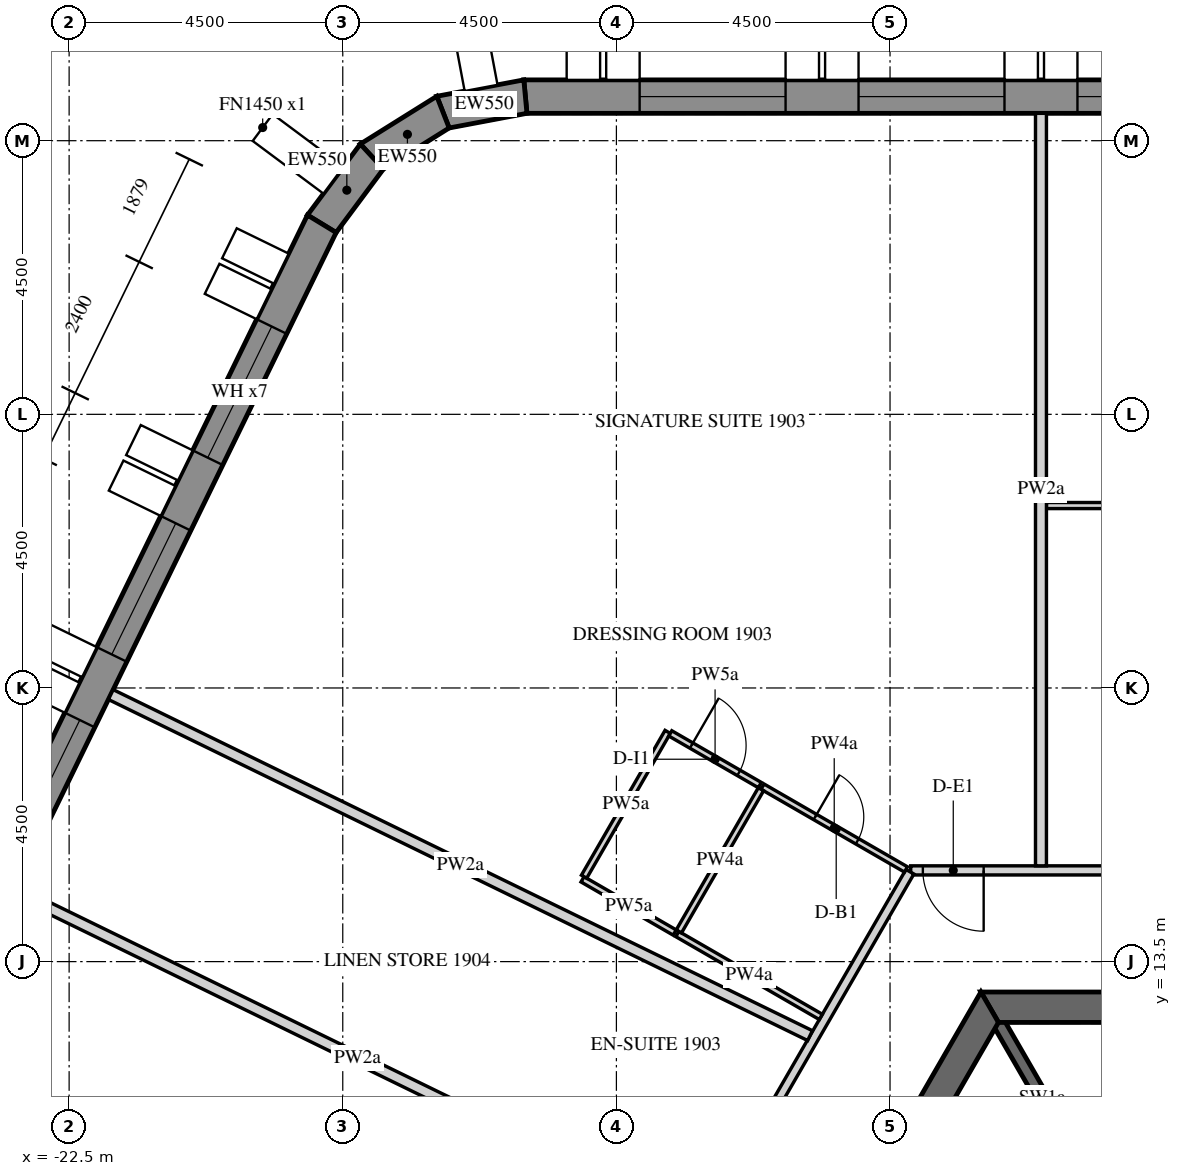
"""IFC4 building model, lengths in metres.
Left out: names, types, materials, properties, quantities, classifications, styles, units other than length and angle.
Written with IfcOpenShell. Run it as: python <this file> out.ifc"""

import sys

from ifc_helpers import new_model, si_unit, direction, frame, frame_2d, origin, place, context, subcontext, project, spatial, polyline, rectangle, outline, extrude, element, fill, save


model = new_model("IFC4")
c1 = context("Model", 3, precision=1e-05, world=origin(), true_north=direction((0.0, 1.0)))
c2 = subcontext(c1, "Body", "Model", "MODEL_VIEW")
j1 = project(units=[si_unit("LENGTHUNIT", "METRE"), si_unit("PLANEANGLEUNIT", "RADIAN")], contexts=[c1])
p1 = place(None, origin())
s1 = spatial("IfcSite", under=j1, at=p1, CompositionType="ELEMENT")
p2 = place(p1, origin())
s2 = spatial("IfcBuilding", under=s1, at=p2, CompositionType="ELEMENT")
p3 = place(p2, frame((0.0, 0.0, 238.5)))
s3 = spatial("IfcBuildingStorey", under=s2, at=p3, CompositionType="ELEMENT", Elevation=238.5)
p4 = place(p3, frame((12.761, 27.725, -0.15), z_axis=(0.0, 0.0, 1.0), x_axis=(-1.0, 0.0, 0.0)))
e1 = element("IfcWall", 1, at=p4, inside=s3, PredefinedType="SOLIDWALL", context=c2, shape_type="SweptSolid", body=[
    extrude(outline(polyline([(-0.022, -0.275), (27.783, -0.275), (27.732, 0.275), (0.022, 0.275), (-0.022, -0.275)])), origin(), (0.0, 0.0, 1.0), 3.9),
])
p5 = place(p4, frame((1.879, 0.0, 1.05)))
e2 = element("IfcOpeningElement", 2, at=p5, cuts=e1, PredefinedType="OPENING", context=c2, shape_type="SweptSolid", body=[
    extrude(rectangle(XDim=2.4, YDim=2.4, at=frame_2d((1.2, 1.2))), frame((0.0, 0.285, 0.0), z_axis=(0.0, -1.0, 0.0), x_axis=(1.0, 0.0, 0.0)), (0.0, 0.0, 1.0), 0.57),
])
p6 = place(p4, frame((5.479, 0.0, 1.05)))
e3 = element("IfcOpeningElement", 3, at=p6, cuts=e1, PredefinedType="OPENING", context=c2, shape_type="SweptSolid", body=[
    extrude(rectangle(XDim=2.4, YDim=2.4, at=frame_2d((1.2, 1.2))), frame((0.0, 0.285, 0.0), z_axis=(0.0, -1.0, 0.0), x_axis=(1.0, 0.0, 0.0)), (0.0, 0.0, 1.0), 0.57),
])
p7 = place(p4, frame((9.079, 0.0, 1.05)))
e4 = element("IfcOpeningElement", 4, at=p7, cuts=e1, PredefinedType="OPENING", context=c2, shape_type="SweptSolid", body=[
    extrude(rectangle(XDim=2.4, YDim=2.4, at=frame_2d((1.2, 1.2))), frame((0.0, 0.285, 0.0), z_axis=(0.0, -1.0, 0.0), x_axis=(1.0, 0.0, 0.0)), (0.0, 0.0, 1.0), 0.57),
])
p8 = place(p4, frame((12.679, 0.0, 1.05)))
e5 = element("IfcOpeningElement", 5, at=p8, cuts=e1, PredefinedType="OPENING", context=c2, shape_type="SweptSolid", body=[
    extrude(rectangle(XDim=2.4, YDim=2.4, at=frame_2d((1.2, 1.2))), frame((0.0, 0.285, 0.0), z_axis=(0.0, -1.0, 0.0), x_axis=(1.0, 0.0, 0.0)), (0.0, 0.0, 1.0), 0.57),
])
p9 = place(p4, frame((16.279, 0.0, 1.05)))
e6 = element("IfcOpeningElement", 6, at=p9, cuts=e1, PredefinedType="OPENING", context=c2, shape_type="SweptSolid", body=[
    extrude(rectangle(XDim=2.4, YDim=2.4, at=frame_2d((1.2, 1.2))), frame((0.0, 0.285, 0.0), z_axis=(0.0, -1.0, 0.0), x_axis=(1.0, 0.0, 0.0)), (0.0, 0.0, 1.0), 0.57),
])
p10 = place(p4, frame((19.879, 0.0, 1.05)))
e7 = element("IfcOpeningElement", 7, at=p10, cuts=e1, PredefinedType="OPENING", context=c2, shape_type="SweptSolid", body=[
    extrude(rectangle(XDim=2.4, YDim=2.4, at=frame_2d((1.2, 1.2))), frame((0.0, 0.285, 0.0), z_axis=(0.0, -1.0, 0.0), x_axis=(1.0, 0.0, 0.0)), (0.0, 0.0, 1.0), 0.57),
])
p11 = place(p4, frame((23.479, 0.0, 1.05)))
e8 = element("IfcOpeningElement", 8, at=p11, cuts=e1, PredefinedType="OPENING", context=c2, shape_type="SweptSolid", body=[
    extrude(rectangle(XDim=2.4, YDim=2.4, at=frame_2d((1.2, 1.2))), frame((0.0, 0.285, 0.0), z_axis=(0.0, -1.0, 0.0), x_axis=(1.0, 0.0, 0.0)), (0.0, 0.0, 1.0), 0.57),
])
p12 = place(p3, frame((-14.997, 27.725, -0.15), z_axis=(0.0, 0.0, 1.0), x_axis=(-0.982705443133, -0.185175624845, 0.0)))
e9 = element("IfcWall", 9, at=p12, inside=s3, PredefinedType="SOLIDWALL", context=c2, shape_type="SweptSolid", body=[
    extrude(outline(polyline([(-0.026, -0.275), (1.431, -0.275), (1.327, 0.275), (0.026, 0.275), (-0.026, -0.275)])), origin(), (0.0, 0.0, 1.0), 3.9),
])
p13 = place(p3, frame((-16.352, 27.47, -0.15), z_axis=(0.0, 0.0, 1.0), x_axis=(-0.848057977594, -0.5299034503, 0.0)))
e10 = element("IfcWall", 10, at=p13, inside=s3, PredefinedType="SOLIDWALL", context=c2, shape_type="SweptSolid", body=[
    extrude(outline(polyline([(-0.052, -0.275), (1.431, -0.275), (1.327, 0.275), (0.052, 0.275), (-0.052, -0.275)])), origin(), (0.0, 0.0, 1.0), 3.9),
])
p14 = place(p3, frame((-17.521, 26.739, -0.15), z_axis=(0.0, 0.0, 1.0), x_axis=(-0.597135295884, -0.802140535324, 0.0)))
e11 = element("IfcWall", 11, at=p14, inside=s3, PredefinedType="SOLIDWALL", context=c2, shape_type="SweptSolid", body=[
    extrude(outline(polyline([(-0.052, -0.275), (1.405, -0.275), (1.354, 0.275), (0.052, 0.275), (-0.052, -0.275)])), origin(), (0.0, 0.0, 1.0), 3.9),
])
p15 = place(p3, frame((-18.345, 25.633, -0.15), z_axis=(0.0, 0.0, 1.0), x_axis=(-0.43837181828, -0.898793718791, 0.0)))
e12 = element("IfcWall", 12, at=p15, inside=s3, PredefinedType="SOLIDWALL", context=c2, shape_type="SweptSolid", body=[
    extrude(outline(polyline([(-0.026, -0.275), (27.78, -0.275), (27.735, 0.275), (0.026, 0.275), (-0.026, -0.275)])), origin(), (0.0, 0.0, 1.0), 3.9),
])
p16 = place(p15, frame((1.879, 0.0, 1.05)))
e13 = element("IfcOpeningElement", 13, at=p16, cuts=e12, PredefinedType="OPENING", context=c2, shape_type="SweptSolid", body=[
    extrude(rectangle(XDim=2.4, YDim=2.4, at=frame_2d((1.2, 1.2))), frame((0.0, 0.285, 0.0), z_axis=(0.0, -1.0, 0.0), x_axis=(1.0, 0.0, 0.0)), (0.0, 0.0, 1.0), 0.57),
])
p17 = place(p15, frame((5.479, 0.0, 1.05)))
e14 = element("IfcOpeningElement", 14, at=p17, cuts=e12, PredefinedType="OPENING", context=c2, shape_type="SweptSolid", body=[
    extrude(rectangle(XDim=2.4, YDim=2.4, at=frame_2d((1.2, 1.2))), frame((0.0, 0.285, 0.0), z_axis=(0.0, -1.0, 0.0), x_axis=(1.0, 0.0, 0.0)), (0.0, 0.0, 1.0), 0.57),
])
p18 = place(p15, frame((9.079, 0.0, 1.05)))
e15 = element("IfcOpeningElement", 15, at=p18, cuts=e12, PredefinedType="OPENING", context=c2, shape_type="SweptSolid", body=[
    extrude(rectangle(XDim=2.4, YDim=2.4, at=frame_2d((1.2, 1.2))), frame((0.0, 0.285, 0.0), z_axis=(0.0, -1.0, 0.0), x_axis=(1.0, 0.0, 0.0)), (0.0, 0.0, 1.0), 0.57),
])
p19 = place(p15, frame((12.679, 0.0, 1.05)))
e16 = element("IfcOpeningElement", 16, at=p19, cuts=e12, PredefinedType="OPENING", context=c2, shape_type="SweptSolid", body=[
    extrude(rectangle(XDim=2.4, YDim=2.4, at=frame_2d((1.2, 1.2))), frame((0.0, 0.285, 0.0), z_axis=(0.0, -1.0, 0.0), x_axis=(1.0, 0.0, 0.0)), (0.0, 0.0, 1.0), 0.57),
])
p20 = place(p15, frame((16.279, 0.0, 1.05)))
e17 = element("IfcOpeningElement", 17, at=p20, cuts=e12, PredefinedType="OPENING", context=c2, shape_type="SweptSolid", body=[
    extrude(rectangle(XDim=2.4, YDim=2.4, at=frame_2d((1.2, 1.2))), frame((0.0, 0.285, 0.0), z_axis=(0.0, -1.0, 0.0), x_axis=(1.0, 0.0, 0.0)), (0.0, 0.0, 1.0), 0.57),
])
p21 = place(p15, frame((19.879, 0.0, 1.05)))
e18 = element("IfcOpeningElement", 18, at=p21, cuts=e12, PredefinedType="OPENING", context=c2, shape_type="SweptSolid", body=[
    extrude(rectangle(XDim=2.4, YDim=2.4, at=frame_2d((1.2, 1.2))), frame((0.0, 0.285, 0.0), z_axis=(0.0, -1.0, 0.0), x_axis=(1.0, 0.0, 0.0)), (0.0, 0.0, 1.0), 0.57),
])
p22 = place(p15, frame((23.479, 0.0, 1.05)))
e19 = element("IfcOpeningElement", 19, at=p22, cuts=e12, PredefinedType="OPENING", context=c2, shape_type="SweptSolid", body=[
    extrude(rectangle(XDim=2.4, YDim=2.4, at=frame_2d((1.2, 1.2))), frame((0.0, 0.285, 0.0), z_axis=(0.0, -1.0, 0.0), x_axis=(1.0, 0.0, 0.0)), (0.0, 0.0, 1.0), 0.57),
])
p23 = place(p3, frame((-7.361, 12.75, -0.15), z_axis=(0.0, 0.0, 1.0), x_axis=(-0.50000571537, -0.866022103989, 0.0)))
e20 = element("IfcWall", 20, at=p23, inside=s3, PredefinedType="SHEAR", context=c2, shape_type="SweptSolid", body=[
    extrude(outline(polyline([(-0.144, -0.25), (14.867, -0.25), (14.578, 0.25), (0.144, 0.25), (-0.144, -0.25)])), origin(), (0.0, 0.0, 1.0), 3.9),
])
p24 = place(p23, frame((6.49, 0.0, 0.15)))
e21 = element("IfcOpeningElement", 21, at=p24, cuts=e20, PredefinedType="OPENING", context=c2, shape_type="SweptSolid", body=[
    extrude(rectangle(XDim=1.8, YDim=2.4, at=frame_2d((0.9, 1.2))), frame((0.0, 0.26, 0.0), z_axis=(0.0, -1.0, 0.0), x_axis=(1.0, 0.0, 0.0)), (0.0, 0.0, 1.0), 0.52),
])
p25 = place(p3, frame((7.361, 12.75, -0.15), z_axis=(0.0, 0.0, 1.0), x_axis=(-1.0, 0.0, 0.0)))
e22 = element("IfcWall", 22, at=p25, inside=s3, PredefinedType="SHEAR", context=c2, shape_type="SweptSolid", body=[
    extrude(outline(polyline([(-0.144, -0.25), (14.866, -0.25), (14.578, 0.25), (0.144, 0.25), (-0.144, -0.25)])), origin(), (0.0, 0.0, 1.0), 3.9),
])
p26 = place(p25, frame((6.761, 0.0, 0.15)))
e23 = element("IfcOpeningElement", 23, at=p26, cuts=e22, PredefinedType="OPENING", context=c2, shape_type="SweptSolid", body=[
    extrude(rectangle(XDim=1.2, YDim=2.4, at=frame_2d((0.6, 1.2))), frame((0.0, 0.26, 0.0), z_axis=(0.0, -1.0, 0.0), x_axis=(1.0, 0.0, 0.0)), (0.0, 0.0, 1.0), 0.52),
])
p27 = place(p3, frame((-5.773, 10.0, -0.15), z_axis=(0.0, 0.0, 1.0), x_axis=(-0.499995765644, 0.866027848477, 0.0)))
e24 = element("IfcWall", 24, at=p27, inside=s3, PredefinedType="SHEAR", context=c2, shape_type="SweptSolid", body=[
    extrude(rectangle(XDim=2.887, YDim=0.2, at=frame_2d((1.443, 0.0))), origin(), (0.0, 0.0, 1.0), 3.9),
])
p28 = place(p3, frame((4.207, 15.0, 0.0), z_axis=(0.0, 0.0, 1.0), x_axis=(-1.0, 0.0, 0.0)))
e25 = element("IfcWall", 25, at=p28, inside=s3, PredefinedType="PARTITIONING", context=c2, shape_type="SweptSolid", body=[
    extrude(rectangle(XDim=12.867, YDim=0.15, at=frame_2d((6.434, 0.0))), origin(), (0.0, 0.0, 1.0), 2.838),
])
p29 = place(p28, frame((6.025, 0.0, 0.0)))
e26 = element("IfcOpeningElement", 26, at=p29, cuts=e25, PredefinedType="OPENING", context=c2, shape_type="SweptSolid", body=[
    extrude(rectangle(XDim=1.0, YDim=2.1, at=frame_2d((0.5, 1.05))), frame((0.0, 0.085, 0.0), z_axis=(0.0, -1.0, 0.0), x_axis=(1.0, 0.0, 0.0)), (0.0, 0.0, 1.0), 0.17),
])
p30 = place(p28, frame((11.667, 0.0, 0.0)))
e27 = element("IfcOpeningElement", 27, at=p30, cuts=e25, PredefinedType="OPENING", context=c2, shape_type="SweptSolid", body=[
    extrude(rectangle(XDim=1.0, YDim=2.1, at=frame_2d((0.5, 1.05))), frame((0.0, 0.085, 0.0), z_axis=(0.0, -1.0, 0.0), x_axis=(1.0, 0.0, 0.0)), (0.0, 0.0, 1.0), 0.17),
])
p31 = place(p3, frame((-8.673, 14.978, 0.0), z_axis=(0.0, 0.0, 1.0), x_axis=(-0.50000700621, -0.86602135871, 0.0)))
e28 = element("IfcWall", 28, at=p31, inside=s3, PredefinedType="PARTITIONING", context=c2, shape_type="SweptSolid", body=[
    extrude(rectangle(XDim=14.928, YDim=0.15, at=frame_2d((7.464, 0.0))), origin(), (0.0, 0.0, 1.0), 2.838),
])
p32 = place(p31, frame((4.454, 0.0, 0.0)))
e29 = element("IfcOpeningElement", 29, at=p32, cuts=e28, PredefinedType="OPENING", context=c2, shape_type="SweptSolid", body=[
    extrude(rectangle(XDim=1.0, YDim=2.1, at=frame_2d((0.5, 1.05))), frame((0.0, 0.085, 0.0), z_axis=(0.0, -1.0, 0.0), x_axis=(1.0, 0.0, 0.0)), (0.0, 0.0, 1.0), 0.17),
])
p33 = place(p31, frame((11.264, 0.0, 0.0)))
e30 = element("IfcOpeningElement", 30, at=p33, cuts=e28, PredefinedType="OPENING", context=c2, shape_type="SweptSolid", body=[
    extrude(rectangle(XDim=1.0, YDim=2.1, at=frame_2d((0.5, 1.05))), frame((0.0, 0.085, 0.0), z_axis=(0.0, -1.0, 0.0), x_axis=(1.0, 0.0, 0.0)), (0.0, 0.0, 1.0), 0.17),
])
p34 = place(p3, frame((0.632, 21.0, 0.0), z_axis=(0.0, 0.0, 1.0), x_axis=(-1.0, 0.0, 0.0)))
e31 = element("IfcWall", 31, at=p34, inside=s3, PredefinedType="PARTITIONING", context=c2, shape_type="SweptSolid", body=[
    extrude(rectangle(XDim=7.06, YDim=0.1, at=frame_2d((3.53, 0.0))), origin(), (0.0, 0.0, 1.0), 2.838),
])
p35 = place(p34, frame((3.1, 0.0, 0.0)))
e32 = element("IfcOpeningElement", 32, at=p35, cuts=e31, PredefinedType="OPENING", context=c2, shape_type="SweptSolid", body=[
    extrude(rectangle(XDim=0.9, YDim=2.1, at=frame_2d((0.45, 1.05))), frame((0.0, 0.06, 0.0), z_axis=(0.0, -1.0, 0.0), x_axis=(1.0, 0.0, 0.0)), (0.0, 0.0, 1.0), 0.12),
])
p36 = place(p3, frame((-6.518, 27.45, 0.0), z_axis=(0.0, 0.0, 1.0), x_axis=(0.0, -1.0, 0.0)))
e33 = element("IfcWall", 33, at=p36, inside=s3, PredefinedType="PARTITIONING", context=c2, shape_type="SweptSolid", body=[
    extrude(rectangle(XDim=12.375, YDim=0.18, at=frame_2d((6.188, 0.0))), origin(), (0.0, 0.0, 1.0), 2.838),
])
p37 = place(p3, frame((-10.138, 12.591, 0.0), z_axis=(0.0, 0.0, 1.0), x_axis=(-0.866051307416, 0.49995513091, 0.0)))
e34 = element("IfcWall", 34, at=p37, inside=s3, PredefinedType="PARTITIONING", context=c2, shape_type="SweptSolid", body=[
    extrude(rectangle(XDim=2.725, YDim=0.1, at=frame_2d((1.362, 0.0))), origin(), (0.0, 0.0, 1.0), 2.838),
])
p38 = place(p3, frame((-11.098, 16.378, 0.0), z_axis=(0.0, 0.0, 1.0), x_axis=(0.866012511928, -0.500022328685, 0.0)))
e35 = element("IfcWall", 35, at=p38, inside=s3, PredefinedType="PARTITIONING", context=c2, shape_type="SweptSolid", body=[
    extrude(rectangle(XDim=2.725, YDim=0.1, at=frame_2d((1.363, 0.0))), origin(), (0.0, 0.0, 1.0), 2.838),
])
p39 = place(p38, frame((1.0, 0.0, 0.0)))
e36 = element("IfcOpeningElement", 36, at=p39, cuts=e35, PredefinedType="OPENING", context=c2, shape_type="SweptSolid", body=[
    extrude(rectangle(XDim=0.8, YDim=2.1, at=frame_2d((0.4, 1.05))), frame((0.0, 0.06, 0.0), z_axis=(0.0, -1.0, 0.0), x_axis=(1.0, 0.0, 0.0)), (0.0, 0.0, 1.0), 0.12),
])
p40 = place(p3, frame((-12.541, 13.978, 0.0), z_axis=(0.0, 0.0, 1.0), x_axis=(-0.866036909293, 0.499980071345, 0.0)))
e37 = element("IfcWall", 37, at=p40, inside=s3, PredefinedType="PARTITIONING", context=c2, shape_type="SweptSolid", body=[
    extrude(rectangle(XDim=1.75, YDim=0.1, at=frame_2d((0.875, 0.0))), origin(), (0.0, 0.0, 1.0), 2.838),
])
p41 = place(p3, frame((-14.031, 14.896, 0.0), z_axis=(0.0, 0.0, 1.0), x_axis=(0.499996545922, 0.866027397988, 0.0)))
e38 = element("IfcWall", 38, at=p41, inside=s3, PredefinedType="PARTITIONING", context=c2, shape_type="SweptSolid", body=[
    extrude(rectangle(XDim=2.75, YDim=0.1, at=frame_2d((1.375, 0.0))), origin(), (0.0, 0.0, 1.0), 2.838),
])
p42 = place(p3, frame((-12.613, 17.253, 0.0), z_axis=(0.0, 0.0, 1.0), x_axis=(0.865989465428, -0.500062241894, 0.0)))
e39 = element("IfcWall", 39, at=p42, inside=s3, PredefinedType="PARTITIONING", context=c2, shape_type="SweptSolid", body=[
    extrude(rectangle(XDim=1.7, YDim=0.1, at=frame_2d((0.85, 0.0))), origin(), (0.0, 0.0, 1.0), 2.838),
])
p43 = place(p42, frame((0.4, 0.0, 0.0)))
e40 = element("IfcOpeningElement", 40, at=p43, cuts=e39, PredefinedType="OPENING", context=c2, shape_type="SweptSolid", body=[
    extrude(rectangle(XDim=0.9, YDim=2.1, at=frame_2d((0.45, 1.05))), frame((0.0, 0.06, 0.0), z_axis=(0.0, -1.0, 0.0), x_axis=(1.0, 0.0, 0.0)), (0.0, 0.0, 1.0), 0.12),
])
p44 = place(p3, frame((-21.815, 17.892, 0.0), z_axis=(0.0, 0.0, 1.0), x_axis=(0.898799253997, -0.438360469265, 0.0)))
e41 = element("IfcWall", 41, at=p44, inside=s3, PredefinedType="PARTITIONING", context=c2, shape_type="SweptSolid", body=[
    extrude(rectangle(XDim=12.794, YDim=0.18, at=frame_2d((6.397, 0.0))), origin(), (0.0, 0.0, 1.0), 2.838),
])
p45 = place(p3, frame((-11.123, 16.335, 0.0), z_axis=(0.0, 0.0, 1.0), x_axis=(-0.499980770555, -0.866036505625, 0.0)))
e42 = element("IfcWall", 42, at=p45, inside=s3, PredefinedType="PARTITIONING", context=c2, shape_type="SweptSolid", body=[
    extrude(rectangle(XDim=2.7, YDim=0.1, at=frame_2d((1.35, 0.0))), origin(), (0.0, 0.0, 1.0), 2.838),
])
p46 = place(p3, frame((-23.393, 14.656, 0.0), z_axis=(0.0, 0.0, 1.0), x_axis=(0.898790706576, -0.43837799417, 0.0)))
e43 = element("IfcWall", 43, at=p46, inside=s3, PredefinedType="PARTITIONING", context=c2, shape_type="SweptSolid", body=[
    extrude(rectangle(XDim=12.542, YDim=0.18, at=frame_2d((6.271, 0.0))), origin(), (0.0, 0.0, 1.0), 2.838),
])
p47 = place(p9, frame((0.0, 0.205, 0.0)))
e44 = element("IfcWindow", 44, at=p47, inside=s3, PartitioningType="DOUBLE_PANEL_VERTICAL", PredefinedType="WINDOW", context=c2, shape_type="SweptSolid", body=[
    extrude(rectangle(XDim=2.4, YDim=2.4, at=frame_2d((1.2, 1.2))), frame((0.0, 0.03, 0.0), z_axis=(0.0, -1.0, 0.0), x_axis=(1.0, 0.0, 0.0)), (0.0, 0.0, 1.0), 0.06),
])
fill(e6, e44)
p48 = place(p10, frame((0.0, 0.205, 0.0)))
e45 = element("IfcWindow", 45, at=p48, inside=s3, PartitioningType="DOUBLE_PANEL_VERTICAL", PredefinedType="WINDOW", context=c2, shape_type="SweptSolid", body=[
    extrude(rectangle(XDim=2.4, YDim=2.4, at=frame_2d((1.2, 1.2))), frame((0.0, 0.03, 0.0), z_axis=(0.0, -1.0, 0.0), x_axis=(1.0, 0.0, 0.0)), (0.0, 0.0, 1.0), 0.06),
])
fill(e7, e45)
p49 = place(p11, frame((0.0, 0.205, 0.0)))
e46 = element("IfcWindow", 46, at=p49, inside=s3, PartitioningType="DOUBLE_PANEL_VERTICAL", PredefinedType="WINDOW", context=c2, shape_type="SweptSolid", body=[
    extrude(rectangle(XDim=2.4, YDim=2.4, at=frame_2d((1.2, 1.2))), frame((0.0, 0.03, 0.0), z_axis=(0.0, -1.0, 0.0), x_axis=(1.0, 0.0, 0.0)), (0.0, 0.0, 1.0), 0.06),
])
fill(e8, e46)
p50 = place(p16, frame((0.0, 0.205, 0.0)))
e47 = element("IfcWindow", 47, at=p50, inside=s3, PartitioningType="DOUBLE_PANEL_VERTICAL", PredefinedType="WINDOW", context=c2, shape_type="SweptSolid", body=[
    extrude(rectangle(XDim=2.4, YDim=2.4, at=frame_2d((1.2, 1.2))), frame((0.0, 0.03, 0.0), z_axis=(0.0, -1.0, 0.0), x_axis=(1.0, 0.0, 0.0)), (0.0, 0.0, 1.0), 0.06),
])
fill(e13, e47)
p51 = place(p17, frame((0.0, 0.205, 0.0)))
e48 = element("IfcWindow", 48, at=p51, inside=s3, PartitioningType="DOUBLE_PANEL_VERTICAL", PredefinedType="WINDOW", context=c2, shape_type="SweptSolid", body=[
    extrude(rectangle(XDim=2.4, YDim=2.4, at=frame_2d((1.2, 1.2))), frame((0.0, 0.03, 0.0), z_axis=(0.0, -1.0, 0.0), x_axis=(1.0, 0.0, 0.0)), (0.0, 0.0, 1.0), 0.06),
])
fill(e14, e48)
p52 = place(p18, frame((0.0, 0.205, 0.0)))
e49 = element("IfcWindow", 49, at=p52, inside=s3, PartitioningType="DOUBLE_PANEL_VERTICAL", PredefinedType="WINDOW", context=c2, shape_type="SweptSolid", body=[
    extrude(rectangle(XDim=2.4, YDim=2.4, at=frame_2d((1.2, 1.2))), frame((0.0, 0.03, 0.0), z_axis=(0.0, -1.0, 0.0), x_axis=(1.0, 0.0, 0.0)), (0.0, 0.0, 1.0), 0.06),
])
fill(e15, e49)
p53 = place(p30, origin())
e50 = element("IfcDoor", 50, at=p53, inside=s3, OperationType="SINGLE_SWING_LEFT", PredefinedType="DOOR", context=c2, shape_type="SweptSolid", body=[
    extrude(rectangle(XDim=1.0, YDim=2.1, at=frame_2d((0.5, 1.05))), frame((0.0, 0.025, 0.0), z_axis=(0.0, -1.0, 0.0), x_axis=(1.0, 0.0, 0.0)), (0.0, 0.0, 1.0), 0.05),
])
fill(e27, e50)
p54 = place(p39, origin())
e51 = element("IfcDoor", 51, at=p54, inside=s3, OperationType="SINGLE_SWING_LEFT", PredefinedType="DOOR", context=c2, shape_type="SweptSolid", body=[
    extrude(rectangle(XDim=0.8, YDim=2.1, at=frame_2d((0.4, 1.05))), frame((0.0, 0.025, 0.0), z_axis=(0.0, -1.0, 0.0), x_axis=(1.0, 0.0, 0.0)), (0.0, 0.0, 1.0), 0.05),
])
fill(e36, e51)
p55 = place(p43, origin())
e52 = element("IfcDoor", 52, at=p55, inside=s3, OperationType="SINGLE_SWING_LEFT", PredefinedType="DOOR", context=c2, shape_type="SweptSolid", body=[
    extrude(rectangle(XDim=0.9, YDim=2.1, at=frame_2d((0.45, 1.05))), frame((0.0, 0.025, 0.0), z_axis=(0.0, -1.0, 0.0), x_axis=(1.0, 0.0, 0.0)), (0.0, 0.0, 1.0), 0.05),
])
fill(e40, e52)
save(model, sys.argv[1])
